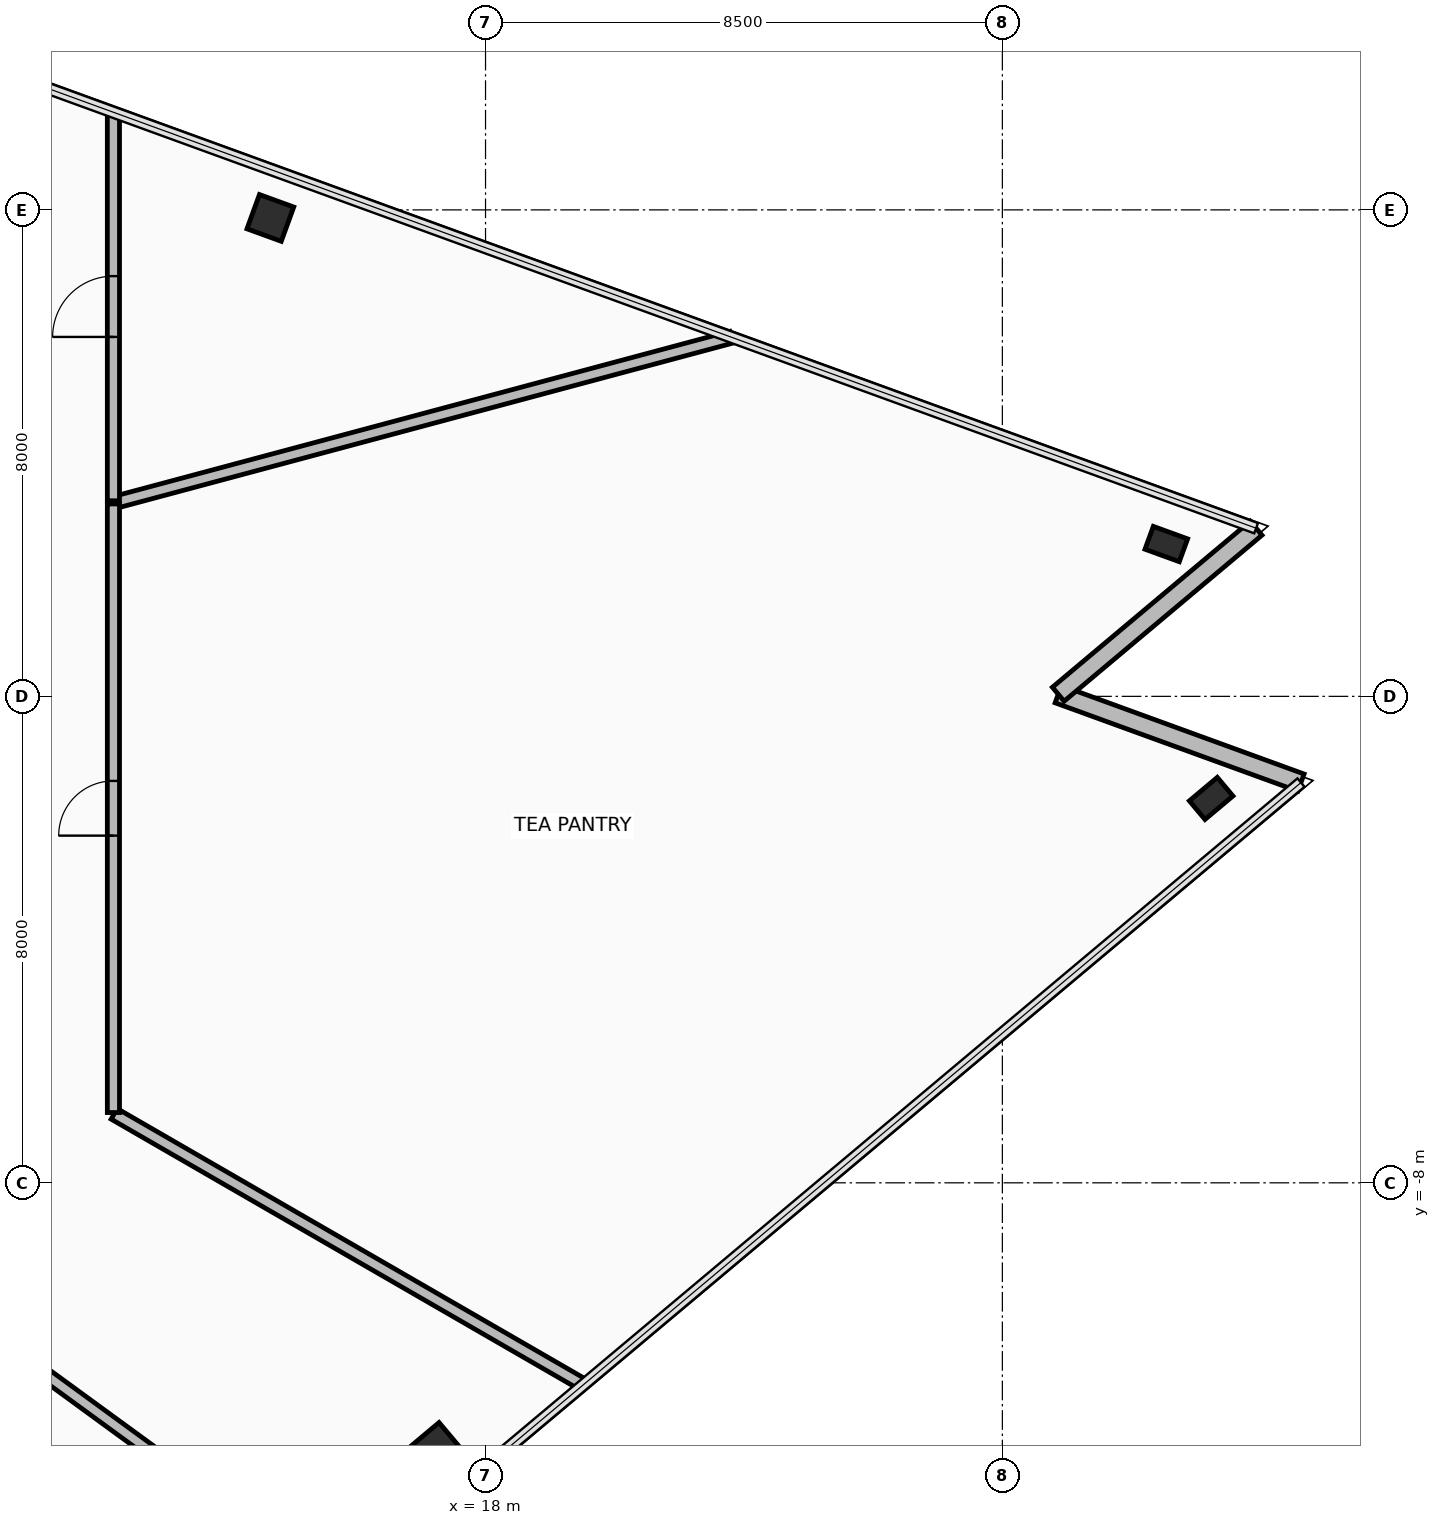
"""IFC4 building model, lengths in metres.
Left out: names, types, materials, properties, quantities, classifications, styles, units other than length and angle.
Written with IfcOpenShell. Run it as: python <this file> out.ifc"""

import sys

from ifc_helpers import new_model, si_unit, direction, frame, frame_2d, origin, origin_2d, place, context, subcontext, project, spatial, rectangle, hollow_rectangle, extrude, element, fill, save


model = new_model("IFC4")
c1 = context("Model", 3, precision=1e-05, world=origin(), true_north=direction((0.0, 1.0)))
c2 = subcontext(c1, "Body", "Model", "MODEL_VIEW")
j1 = project(units=[si_unit("LENGTHUNIT", "METRE"), si_unit("PLANEANGLEUNIT", "RADIAN")], contexts=[c1])
p1 = place(None, origin())
s1 = spatial("IfcSite", under=j1, at=p1, CompositionType="ELEMENT")
p2 = place(p1, origin())
s2 = spatial("IfcBuilding", under=s1, at=p2, CompositionType="ELEMENT")
p3 = place(p2, frame((0.0, 0.0, 177.7)))
s3 = spatial("IfcBuildingStorey", under=s2, at=p3, CompositionType="ELEMENT", Elevation=177.7)
p4 = place(p3, frame((17.198, -12.365, 0.0), z_axis=(0.0, 0.0, 1.0), x_axis=(0.766043321242, 0.642788946685, 0.0)))
e1 = element("IfcColumn", 1, at=p4, inside=s3, PredefinedType="COLUMN", context=c2, shape_type="SweptSolid", body=[
    extrude(hollow_rectangle(XDim=0.6, YDim=0.6, WallThickness=0.036, at=origin_2d()), origin(), (0.0, 0.0, 1.0), 3.6),
])
for number, where, z_axis, x_axis in (
    (2, (29.934, -1.679, 0.0), (0.0, 0.0, 1.0), (0.766, 0.643, 0.0)),
    (3, (29.196, 2.505, 0.0), (0.0, 0.0, 1.0), (-0.94, 0.342, 0.0)),
):
    element("IfcColumn", number, at=place(p3, frame(where, z_axis=z_axis, x_axis=x_axis)), inside=s3, PredefinedType="COLUMN", context=c2, shape_type="SweptSolid", body=[
        extrude(hollow_rectangle(XDim=0.4, YDim=0.6, WallThickness=0.03, at=origin_2d()), origin(), (0.0, 0.0, 1.0), 3.6),
    ])
p5 = place(p3, frame((14.461, 7.868, 0.0), z_axis=(0.0, 0.0, 1.0), x_axis=(-0.939692023847, 0.342021783398, 0.0)))
e4 = element("IfcColumn", 4, at=p5, inside=s3, PredefinedType="COLUMN", context=c2, shape_type="SweptSolid", body=[
    extrude(hollow_rectangle(XDim=0.6, YDim=0.6, WallThickness=0.036, at=origin_2d()), origin(), (0.0, 0.0, 1.0), 3.6),
])
for number, where, z_axis, x_axis in (
    (5, (31.411, -1.418, 0.0), (0.0, 0.0, 1.0), (-0.94, 0.342, 0.0)),
    (6, (27.419, 0.035, 0.0), (0.0, 0.0, 1.0), (0.766, 0.643, 0.0)),
):
    element("IfcWall", number, at=place(p3, frame(where, z_axis=z_axis, x_axis=x_axis)), inside=s3, PredefinedType="STANDARD", context=c2, shape_type="SweptSolid", body=[
        extrude(rectangle(XDim=4.248, YDim=0.3, at=frame_2d((2.124, 0.0))), origin(), (0.0, 0.0, 1.0), 2.715),
    ])
p6 = place(p3, frame((22.043, 5.906, 0.0), z_axis=(0.0, 0.0, 1.0), x_axis=(-0.965923635631, -0.258827220613, 0.0)))
e7 = element("IfcWall", 7, at=p6, inside=s3, PredefinedType="PARTITIONING", context=c2, shape_type="SweptSolid", body=[
    extrude(rectangle(XDim=10.489, YDim=0.2, at=frame_2d((5.245, 0.0))), origin(), (0.0, 0.0, 1.0), 2.715),
])
p7 = place(p3, frame((11.88, 3.216, 0.0), z_axis=(0.0, 0.0, 1.0), x_axis=(0.0, 1.0, 0.0)))
e8 = element("IfcWall", 8, at=p7, inside=s3, PredefinedType="PARTITIONING", context=c2, shape_type="SweptSolid", body=[
    extrude(rectangle(XDim=6.39, YDim=0.2, at=frame_2d((3.195, 0.0))), origin(), (0.0, 0.0, 1.0), 2.715),
])
p8 = place(p7, frame((2.695, 0.0, 0.0)))
e9 = element("IfcOpeningElement", 9, at=p8, cuts=e8, PredefinedType="OPENING", context=c2, shape_type="SweptSolid", body=[
    extrude(rectangle(XDim=1.0, YDim=2.15, at=frame_2d((0.5, 1.075))), frame((0.0, 0.11, 0.0), z_axis=(0.0, -1.0, 0.0), x_axis=(1.0, 0.0, 0.0)), (0.0, 0.0, 1.0), 0.22),
])
p9 = place(p3, frame((9.985, -10.585, 0.0), z_axis=(0.0, 0.0, 1.0), x_axis=(0.807846973011, -0.589392287189, 0.0)))
e10 = element("IfcWall", 10, at=p9, inside=s3, PredefinedType="PARTITIONING", context=c2, shape_type="SweptSolid", body=[
    extrude(rectangle(XDim=6.954, YDim=0.2, at=frame_2d((3.477, 0.0))), origin(), (0.0, 0.0, 1.0), 2.715),
])
p10 = place(p3, frame((19.594, -11.312, 0.0), z_axis=(0.0, 0.0, 1.0), x_axis=(-0.866024653538, 0.500001299462, 0.0)))
e11 = element("IfcWall", 11, at=p10, inside=s3, PredefinedType="PARTITIONING", context=c2, shape_type="SweptSolid", body=[
    extrude(rectangle(XDim=8.893, YDim=0.2, at=frame_2d((4.446, 0.0))), origin(), (0.0, 0.0, 1.0), 2.715),
])
p11 = place(p3, frame((11.88, -6.844, 0.0), z_axis=(0.0, 0.0, 1.0), x_axis=(0.0, 1.0, 0.0)))
e12 = element("IfcWall", 12, at=p11, inside=s3, PredefinedType="PARTITIONING", context=c2, shape_type="SweptSolid", body=[
    extrude(rectangle(XDim=10.009, YDim=0.2, at=frame_2d((5.004, 0.0))), origin(), (0.0, 0.0, 1.0), 2.865),
])
p12 = place(p11, frame((4.554, 0.0, 0.0)))
e13 = element("IfcOpeningElement", 13, at=p12, cuts=e12, PredefinedType="OPENING", context=c2, shape_type="SweptSolid", body=[
    extrude(rectangle(XDim=0.9, YDim=2.1, at=frame_2d((0.45, 1.05))), frame((0.0, 0.11, 0.0), z_axis=(0.0, -1.0, 0.0), x_axis=(1.0, 0.0, 0.0)), (0.0, 0.0, 1.0), 0.22),
])
p13 = place(p8, origin())
e14 = element("IfcDoor", 14, at=p13, inside=s3, OperationType="SINGLE_SWING_RIGHT", PredefinedType="DOOR", context=c2, shape_type="SweptSolid", body=[
    extrude(rectangle(XDim=1.0, YDim=2.15, at=frame_2d((0.5, 1.075))), frame((0.0, 0.025, 0.0), z_axis=(0.0, -1.0, 0.0), x_axis=(1.0, 0.0, 0.0)), (0.0, 0.0, 1.0), 0.05),
])
fill(e9, e14)
p14 = place(p12, origin())
e15 = element("IfcDoor", 15, at=p14, inside=s3, OperationType="SINGLE_SWING_LEFT", PredefinedType="DOOR", context=c2, shape_type="SweptSolid", body=[
    extrude(rectangle(XDim=0.9, YDim=2.1, at=frame_2d((0.45, 1.05))), frame((0.0, 0.025, 0.0), z_axis=(0.0, -1.0, 0.0), x_axis=(1.0, 0.0, 0.0)), (0.0, 0.0, 1.0), 0.05),
])
fill(e13, e15)
save(model, sys.argv[1])
